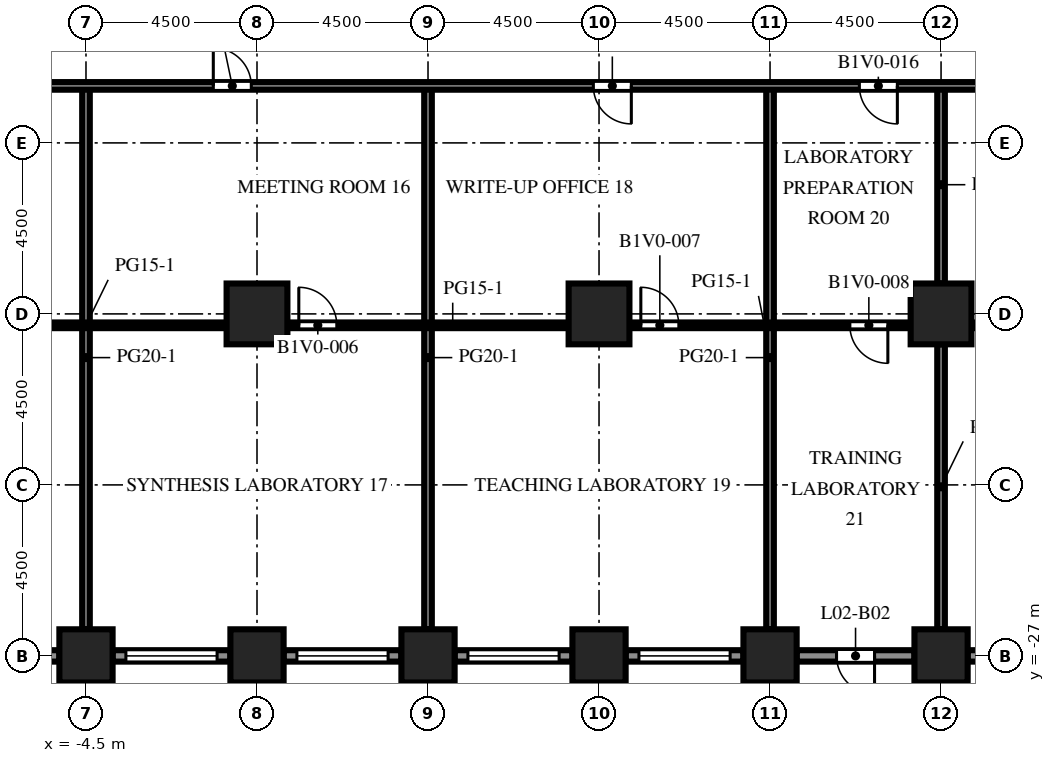
"""IFC4 building model, lengths in metres.
Left out: names, types, materials, properties, quantities, classifications, styles, units other than length and angle.
Written with IfcOpenShell. Run it as: python <this file> out.ifc"""

import sys

from ifc_helpers import new_model, si_unit, direction, frame, frame_2d, origin, origin_2d, place, context, subcontext, project, spatial, rectangle, extrude, element, fill, save


model = new_model("IFC4")
c1 = context("Model", 3, precision=1e-05, world=origin(), true_north=direction((0.0, 1.0)))
c2 = subcontext(c1, "Body", "Model", "MODEL_VIEW")
j1 = project(units=[si_unit("LENGTHUNIT", "METRE"), si_unit("PLANEANGLEUNIT", "RADIAN")], contexts=[c1])
p1 = place(None, origin())
s1 = spatial("IfcSite", under=j1, at=p1, CompositionType="ELEMENT")
p2 = place(p1, origin())
s2 = spatial("IfcBuilding", under=s1, at=p2, CompositionType="ELEMENT")
p3 = place(p2, frame((0.0, 0.0, 11.3)))
s3 = spatial("IfcBuildingStorey", under=s2, at=p3, CompositionType="ELEMENT", Elevation=11.3)
for number, where, z_axis, x_axis in (
    (1, (-4.5, -27.0, 0.0), (0.0, 0.0, 1.0), (1.0, 0.0, 0.0)),
    (2, (0.0, -27.0, 0.0), (0.0, 0.0, 1.0), (1.0, 0.0, 0.0)),
    (3, (4.5, -27.0, 0.0), (0.0, 0.0, 1.0), (1.0, 0.0, 0.0)),
    (4, (9.0, -27.0, 0.0), (0.0, 0.0, 1.0), (1.0, 0.0, 0.0)),
    (5, (13.5, -27.0, 0.0), (0.0, 0.0, 1.0), (1.0, 0.0, 0.0)),
    (6, (18.0, -27.0, 0.0), (0.0, 0.0, 1.0), (1.0, 0.0, 0.0)),
):
    element("IfcColumn", number, at=place(p3, frame(where, z_axis=z_axis, x_axis=x_axis)), inside=s3, PredefinedType="COLUMN", context=c2, shape_type="SweptSolid", body=[
        extrude(rectangle(XDim=1.4, YDim=1.4, at=origin_2d()), origin(), (0.0, 0.0, 1.0), 4.1),
    ])
for number, where, z_axis, x_axis in (
    (7, (0.0, -18.0, 0.0), (0.0, 0.0, 1.0), (1.0, 0.0, 0.0)),
    (8, (9.0, -18.0, 0.0), (0.0, 0.0, 1.0), (1.0, 0.0, 0.0)),
    (9, (18.0, -18.0, 0.0), (0.0, 0.0, 1.0), (1.0, 0.0, 0.0)),
):
    element("IfcColumn", number, at=place(p3, frame(where, z_axis=z_axis, x_axis=x_axis)), inside=s3, PredefinedType="COLUMN", context=c2, shape_type="SweptSolid", body=[
        extrude(rectangle(XDim=1.6, YDim=1.6, at=origin_2d()), origin(), (0.0, 0.0, 1.0), 4.1),
    ])
p4 = place(p3, frame((-5.2, -27.0, 0.0), z_axis=(0.0, 0.0, 1.0), x_axis=(-1.0, 0.0, 0.0)))
e10 = element("IfcWall", 10, at=p4, inside=s3, PredefinedType="SOLIDWALL", context=c2, shape_type="SweptSolid", body=[
    extrude(rectangle(XDim=3.1, YDim=0.3, at=frame_2d((1.55, 0.0))), origin(), (0.0, 0.0, 1.0), 2.75),
])
p5 = place(p4, frame((0.35, 0.0, 0.8)))
e11 = element("IfcOpeningElement", 11, at=p5, cuts=e10, PredefinedType="OPENING", context=c2, shape_type="SweptSolid", body=[
    extrude(rectangle(XDim=2.4, YDim=1.7, at=frame_2d((1.2, 0.85))), frame((0.0, 0.16, 0.0), z_axis=(0.0, -1.0, 0.0), x_axis=(1.0, 0.0, 0.0)), (0.0, 0.0, 1.0), 0.32),
])
p6 = place(p3, frame((-0.7, -27.0, 0.0), z_axis=(0.0, 0.0, 1.0), x_axis=(-1.0, 0.0, 0.0)))
e12 = element("IfcWall", 12, at=p6, inside=s3, PredefinedType="SOLIDWALL", context=c2, shape_type="SweptSolid", body=[
    extrude(rectangle(XDim=3.1, YDim=0.3, at=frame_2d((1.55, 0.0))), origin(), (0.0, 0.0, 1.0), 2.75),
])
p7 = place(p6, frame((0.35, 0.0, 0.8)))
e13 = element("IfcOpeningElement", 13, at=p7, cuts=e12, PredefinedType="OPENING", context=c2, shape_type="SweptSolid", body=[
    extrude(rectangle(XDim=2.4, YDim=1.7, at=frame_2d((1.2, 0.85))), frame((0.0, 0.16, 0.0), z_axis=(0.0, -1.0, 0.0), x_axis=(1.0, 0.0, 0.0)), (0.0, 0.0, 1.0), 0.32),
])
p8 = place(p3, frame((3.8, -27.0, 0.0), z_axis=(0.0, 0.0, 1.0), x_axis=(-1.0, 0.0, 0.0)))
e14 = element("IfcWall", 14, at=p8, inside=s3, PredefinedType="SOLIDWALL", context=c2, shape_type="SweptSolid", body=[
    extrude(rectangle(XDim=3.1, YDim=0.3, at=frame_2d((1.55, 0.0))), origin(), (0.0, 0.0, 1.0), 2.75),
])
p9 = place(p8, frame((0.35, 0.0, 0.8)))
e15 = element("IfcOpeningElement", 15, at=p9, cuts=e14, PredefinedType="OPENING", context=c2, shape_type="SweptSolid", body=[
    extrude(rectangle(XDim=2.4, YDim=1.7, at=frame_2d((1.2, 0.85))), frame((0.0, 0.16, 0.0), z_axis=(0.0, -1.0, 0.0), x_axis=(1.0, 0.0, 0.0)), (0.0, 0.0, 1.0), 0.32),
])
p10 = place(p3, frame((8.3, -27.0, 0.0), z_axis=(0.0, 0.0, 1.0), x_axis=(-1.0, 0.0, 0.0)))
e16 = element("IfcWall", 16, at=p10, inside=s3, PredefinedType="SOLIDWALL", context=c2, shape_type="SweptSolid", body=[
    extrude(rectangle(XDim=3.1, YDim=0.3, at=frame_2d((1.55, 0.0))), origin(), (0.0, 0.0, 1.0), 2.75),
])
p11 = place(p10, frame((0.35, 0.0, 0.8)))
e17 = element("IfcOpeningElement", 17, at=p11, cuts=e16, PredefinedType="OPENING", context=c2, shape_type="SweptSolid", body=[
    extrude(rectangle(XDim=2.4, YDim=1.7, at=frame_2d((1.2, 0.85))), frame((0.0, 0.16, 0.0), z_axis=(0.0, -1.0, 0.0), x_axis=(1.0, 0.0, 0.0)), (0.0, 0.0, 1.0), 0.32),
])
p12 = place(p3, frame((12.8, -27.0, 0.0), z_axis=(0.0, 0.0, 1.0), x_axis=(-1.0, 0.0, 0.0)))
e18 = element("IfcWall", 18, at=p12, inside=s3, PredefinedType="SOLIDWALL", context=c2, shape_type="SweptSolid", body=[
    extrude(rectangle(XDim=3.1, YDim=0.3, at=frame_2d((1.55, 0.0))), origin(), (0.0, 0.0, 1.0), 2.75),
])
p13 = place(p12, frame((0.35, 0.0, 0.8)))
e19 = element("IfcOpeningElement", 19, at=p13, cuts=e18, PredefinedType="OPENING", context=c2, shape_type="SweptSolid", body=[
    extrude(rectangle(XDim=2.4, YDim=1.7, at=frame_2d((1.2, 0.85))), frame((0.0, 0.16, 0.0), z_axis=(0.0, -1.0, 0.0), x_axis=(1.0, 0.0, 0.0)), (0.0, 0.0, 1.0), 0.32),
])
p14 = place(p3, frame((17.3, -27.0, 0.0), z_axis=(0.0, 0.0, 1.0), x_axis=(-1.0, 0.0, 0.0)))
e20 = element("IfcWall", 20, at=p14, inside=s3, PredefinedType="SOLIDWALL", context=c2, shape_type="SweptSolid", body=[
    extrude(rectangle(XDim=3.1, YDim=0.3, at=frame_2d((1.55, 0.0))), origin(), (0.0, 0.0, 1.0), 2.75),
])
p15 = place(p14, frame((1.05, 0.0, 0.0)))
e21 = element("IfcOpeningElement", 21, at=p15, cuts=e20, PredefinedType="OPENING", context=c2, shape_type="SweptSolid", body=[
    extrude(rectangle(XDim=1.0, YDim=2.2, at=frame_2d((0.5, 1.1))), frame((0.0, 0.16, 0.0), z_axis=(0.0, -1.0, 0.0), x_axis=(1.0, 0.0, 0.0)), (0.0, 0.0, 1.0), 0.32),
])
p16 = place(p3, frame((21.8, -27.0, 0.0), z_axis=(0.0, 0.0, 1.0), x_axis=(-1.0, 0.0, 0.0)))
e22 = element("IfcWall", 22, at=p16, inside=s3, PredefinedType="SOLIDWALL", context=c2, shape_type="SweptSolid", body=[
    extrude(rectangle(XDim=3.1, YDim=0.3, at=frame_2d((1.55, 0.0))), origin(), (0.0, 0.0, 1.0), 2.75),
])
p17 = place(p16, frame((0.35, 0.0, 0.8)))
e23 = element("IfcOpeningElement", 23, at=p17, cuts=e22, PredefinedType="OPENING", context=c2, shape_type="SweptSolid", body=[
    extrude(rectangle(XDim=2.4, YDim=1.7, at=frame_2d((1.2, 0.85))), frame((0.0, 0.16, 0.0), z_axis=(0.0, -1.0, 0.0), x_axis=(1.0, 0.0, 0.0)), (0.0, 0.0, 1.0), 0.32),
])
for number, where, z_axis, x_axis in (
    (24, (-4.5, -26.3, 0.0), (0.0, 0.0, 1.0), (0.0, 1.0, 0.0)),
    (25, (4.5, -26.3, 0.0), (0.0, 0.0, 1.0), (0.0, 1.0, 0.0)),
    (26, (13.5, -26.3, 0.0), (0.0, 0.0, 1.0), (0.0, 1.0, 0.0)),
):
    element("IfcWall", number, at=place(p3, frame(where, z_axis=z_axis, x_axis=x_axis)), inside=s3, PredefinedType="PARTITIONING", context=c2, shape_type="SweptSolid", body=[
        extrude(rectangle(XDim=14.3, YDim=0.2, at=frame_2d((7.15, 0.0))), origin(), (0.0, 0.0, 1.0), 3.65),
    ])
p18 = place(p3, frame((18.0, -26.3, 0.0), z_axis=(0.0, 0.0, 1.0), x_axis=(0.0, 1.0, 0.0)))
e27 = element("IfcWall", 27, at=p18, inside=s3, PredefinedType="PARTITIONING", context=c2, shape_type="SweptSolid", body=[
    extrude(rectangle(XDim=7.5, YDim=0.2, at=frame_2d((3.75, 0.0))), origin(), (0.0, 0.0, 1.0), 3.65),
])
p19 = place(p3, frame((18.0, -17.2, 0.0), z_axis=(0.0, 0.0, 1.0), x_axis=(0.0, 1.0, 0.0)))
e28 = element("IfcWall", 28, at=p19, inside=s3, PredefinedType="PARTITIONING", context=c2, shape_type="SweptSolid", body=[
    extrude(rectangle(XDim=5.2, YDim=0.2, at=frame_2d((2.6, 0.0))), origin(), (0.0, 0.0, 1.0), 3.65),
])
p20 = place(p3, frame((-8.2, -18.3, 0.0), z_axis=(0.0, 0.0, 1.0), x_axis=(1.0, 0.0, 0.0)))
e29 = element("IfcWall", 29, at=p20, inside=s3, PredefinedType="PARTITIONING", context=c2, shape_type="SweptSolid", body=[
    extrude(rectangle(XDim=7.4, YDim=0.15, at=frame_2d((3.7, 0.0))), origin(), (0.0, 0.0, 1.0), 3.65),
])
p21 = place(p3, frame((8.2, -18.3, 0.0), z_axis=(0.0, 0.0, 1.0), x_axis=(-1.0, 0.0, 0.0)))
e30 = element("IfcWall", 30, at=p21, inside=s3, PredefinedType="PARTITIONING", context=c2, shape_type="SweptSolid", body=[
    extrude(rectangle(XDim=7.4, YDim=0.15, at=frame_2d((3.7, 0.0))), origin(), (0.0, 0.0, 1.0), 3.65),
])
p22 = place(p21, frame((6.1, 0.0, 0.0)))
e31 = element("IfcOpeningElement", 31, at=p22, cuts=e30, PredefinedType="OPENING", context=c2, shape_type="SweptSolid", body=[
    extrude(rectangle(XDim=1.0, YDim=2.1, at=frame_2d((0.5, 1.05))), frame((0.0, 0.085, 0.0), z_axis=(0.0, -1.0, 0.0), x_axis=(1.0, 0.0, 0.0)), (0.0, 0.0, 1.0), 0.17),
])
p23 = place(p3, frame((17.2, -18.3, 0.0), z_axis=(0.0, 0.0, 1.0), x_axis=(-1.0, 0.0, 0.0)))
e32 = element("IfcWall", 32, at=p23, inside=s3, PredefinedType="PARTITIONING", context=c2, shape_type="SweptSolid", body=[
    extrude(rectangle(XDim=7.4, YDim=0.15, at=frame_2d((3.7, 0.0))), origin(), (0.0, 0.0, 1.0), 3.65),
])
p24 = place(p23, frame((6.1, 0.0, 0.0)))
e33 = element("IfcOpeningElement", 33, at=p24, cuts=e32, PredefinedType="OPENING", context=c2, shape_type="SweptSolid", body=[
    extrude(rectangle(XDim=1.0, YDim=2.1, at=frame_2d((0.5, 1.05))), frame((0.0, 0.085, 0.0), z_axis=(0.0, -1.0, 0.0), x_axis=(1.0, 0.0, 0.0)), (0.0, 0.0, 1.0), 0.17),
])
p25 = place(p23, frame((0.6, 0.0, 0.0)))
e34 = element("IfcOpeningElement", 34, at=p25, cuts=e32, PredefinedType="OPENING", context=c2, shape_type="SweptSolid", body=[
    extrude(rectangle(XDim=1.0, YDim=2.1, at=frame_2d((0.5, 1.05))), frame((0.0, 0.085, 0.0), z_axis=(0.0, -1.0, 0.0), x_axis=(1.0, 0.0, 0.0)), (0.0, 0.0, 1.0), 0.17),
])
p26 = place(p3, frame((18.8, -18.3, 0.0), z_axis=(0.0, 0.0, 1.0), x_axis=(1.0, 0.0, 0.0)))
e35 = element("IfcWall", 35, at=p26, inside=s3, PredefinedType="PARTITIONING", context=c2, shape_type="SweptSolid", body=[
    extrude(rectangle(XDim=2.9, YDim=0.15, at=frame_2d((1.45, 0.0))), origin(), (0.0, 0.0, 1.0), 3.65),
])
p27 = place(p3, frame((26.85, -12.0, 0.0), z_axis=(0.0, 0.0, 1.0), x_axis=(-1.0, 0.0, 0.0)))
e36 = element("IfcWall", 36, at=p27, inside=s3, PredefinedType="PARTITIONING", context=c2, shape_type="SweptSolid", body=[
    extrude(rectangle(XDim=53.7, YDim=0.2, at=frame_2d((26.85, 0.0))), origin(), (0.0, 0.0, 1.0), 3.65),
])
p28 = place(p27, frame((47.75, 0.0, 0.0)))
e37 = element("IfcOpeningElement", 37, at=p28, cuts=e36, PredefinedType="OPENING", context=c2, shape_type="SweptSolid", body=[
    extrude(rectangle(XDim=1.0, YDim=2.1, at=frame_2d((0.5, 1.05))), frame((0.0, 0.11, 0.0), z_axis=(0.0, -1.0, 0.0), x_axis=(1.0, 0.0, 0.0)), (0.0, 0.0, 1.0), 0.22),
])
p29 = place(p27, frame((39.5, 0.0, 0.0)))
e38 = element("IfcOpeningElement", 38, at=p29, cuts=e36, PredefinedType="OPENING", context=c2, shape_type="SweptSolid", body=[
    extrude(rectangle(XDim=1.0, YDim=2.1, at=frame_2d((0.5, 1.05))), frame((0.0, 0.11, 0.0), z_axis=(0.0, -1.0, 0.0), x_axis=(1.0, 0.0, 0.0)), (0.0, 0.0, 1.0), 0.22),
])
p30 = place(p27, frame((27.0, 0.0, 0.0)))
e39 = element("IfcOpeningElement", 39, at=p30, cuts=e36, PredefinedType="OPENING", context=c2, shape_type="SweptSolid", body=[
    extrude(rectangle(XDim=1.0, YDim=2.1, at=frame_2d((0.5, 1.05))), frame((0.0, 0.11, 0.0), z_axis=(0.0, -1.0, 0.0), x_axis=(1.0, 0.0, 0.0)), (0.0, 0.0, 1.0), 0.22),
])
p31 = place(p27, frame((17.0, 0.0, 0.0)))
e40 = element("IfcOpeningElement", 40, at=p31, cuts=e36, PredefinedType="OPENING", context=c2, shape_type="SweptSolid", body=[
    extrude(rectangle(XDim=1.0, YDim=2.1, at=frame_2d((0.5, 1.05))), frame((0.0, 0.11, 0.0), z_axis=(0.0, -1.0, 0.0), x_axis=(1.0, 0.0, 0.0)), (0.0, 0.0, 1.0), 0.22),
])
p32 = place(p27, frame((10.0, 0.0, 0.0)))
e41 = element("IfcOpeningElement", 41, at=p32, cuts=e36, PredefinedType="OPENING", context=c2, shape_type="SweptSolid", body=[
    extrude(rectangle(XDim=1.0, YDim=2.1, at=frame_2d((0.5, 1.05))), frame((0.0, 0.11, 0.0), z_axis=(0.0, -1.0, 0.0), x_axis=(1.0, 0.0, 0.0)), (0.0, 0.0, 1.0), 0.22),
])
p33 = place(p27, frame((4.0, 0.0, 0.0)))
e42 = element("IfcOpeningElement", 42, at=p33, cuts=e36, PredefinedType="OPENING", context=c2, shape_type="SweptSolid", body=[
    extrude(rectangle(XDim=1.0, YDim=2.1, at=frame_2d((0.5, 1.05))), frame((0.0, 0.11, 0.0), z_axis=(0.0, -1.0, 0.0), x_axis=(1.0, 0.0, 0.0)), (0.0, 0.0, 1.0), 0.22),
])
p34 = place(p7, origin())
e43 = element("IfcWindow", 43, at=p34, inside=s3, PartitioningType="SINGLE_PANEL", PredefinedType="WINDOW", context=c2, shape_type="SweptSolid", body=[
    extrude(rectangle(XDim=2.4, YDim=1.7, at=frame_2d((1.2, 0.85))), frame((0.0, 0.03, 0.0), z_axis=(0.0, -1.0, 0.0), x_axis=(1.0, 0.0, 0.0)), (0.0, 0.0, 1.0), 0.06),
])
fill(e13, e43)
p35 = place(p9, origin())
e44 = element("IfcWindow", 44, at=p35, inside=s3, PartitioningType="SINGLE_PANEL", PredefinedType="WINDOW", context=c2, shape_type="SweptSolid", body=[
    extrude(rectangle(XDim=2.4, YDim=1.7, at=frame_2d((1.2, 0.85))), frame((0.0, 0.03, 0.0), z_axis=(0.0, -1.0, 0.0), x_axis=(1.0, 0.0, 0.0)), (0.0, 0.0, 1.0), 0.06),
])
fill(e15, e44)
p36 = place(p11, origin())
e45 = element("IfcWindow", 45, at=p36, inside=s3, PartitioningType="SINGLE_PANEL", PredefinedType="WINDOW", context=c2, shape_type="SweptSolid", body=[
    extrude(rectangle(XDim=2.4, YDim=1.7, at=frame_2d((1.2, 0.85))), frame((0.0, 0.03, 0.0), z_axis=(0.0, -1.0, 0.0), x_axis=(1.0, 0.0, 0.0)), (0.0, 0.0, 1.0), 0.06),
])
fill(e17, e45)
p37 = place(p13, origin())
e46 = element("IfcWindow", 46, at=p37, inside=s3, PartitioningType="SINGLE_PANEL", PredefinedType="WINDOW", context=c2, shape_type="SweptSolid", body=[
    extrude(rectangle(XDim=2.4, YDim=1.7, at=frame_2d((1.2, 0.85))), frame((0.0, 0.03, 0.0), z_axis=(0.0, -1.0, 0.0), x_axis=(1.0, 0.0, 0.0)), (0.0, 0.0, 1.0), 0.06),
])
fill(e19, e46)
p38 = place(p15, origin())
e47 = element("IfcDoor", 47, at=p38, inside=s3, OperationType="SINGLE_SWING_LEFT", PredefinedType="DOOR", context=c2, shape_type="SweptSolid", body=[
    extrude(rectangle(XDim=1.0, YDim=2.2, at=frame_2d((0.5, 1.1))), frame((0.0, 0.025, 0.0), z_axis=(0.0, -1.0, 0.0), x_axis=(1.0, 0.0, 0.0)), (0.0, 0.0, 1.0), 0.05),
])
fill(e21, e47)
p39 = place(p22, origin())
e48 = element("IfcDoor", 48, at=p39, inside=s3, OperationType="SINGLE_SWING_RIGHT", PredefinedType="DOOR", context=c2, shape_type="SweptSolid", body=[
    extrude(rectangle(XDim=1.0, YDim=2.1, at=frame_2d((0.5, 1.05))), frame((0.0, 0.025, 0.0), z_axis=(0.0, -1.0, 0.0), x_axis=(1.0, 0.0, 0.0)), (0.0, 0.0, 1.0), 0.05),
])
fill(e31, e48)
p40 = place(p24, origin())
e49 = element("IfcDoor", 49, at=p40, inside=s3, OperationType="SINGLE_SWING_RIGHT", PredefinedType="DOOR", context=c2, shape_type="SweptSolid", body=[
    extrude(rectangle(XDim=1.0, YDim=2.1, at=frame_2d((0.5, 1.05))), frame((0.0, 0.025, 0.0), z_axis=(0.0, -1.0, 0.0), x_axis=(1.0, 0.0, 0.0)), (0.0, 0.0, 1.0), 0.05),
])
fill(e33, e49)
p41 = place(p25, origin())
e50 = element("IfcDoor", 50, at=p41, inside=s3, OperationType="SINGLE_SWING_LEFT", PredefinedType="DOOR", context=c2, shape_type="SweptSolid", body=[
    extrude(rectangle(XDim=1.0, YDim=2.1, at=frame_2d((0.5, 1.05))), frame((0.0, 0.025, 0.0), z_axis=(0.0, -1.0, 0.0), x_axis=(1.0, 0.0, 0.0)), (0.0, 0.0, 1.0), 0.05),
])
fill(e34, e50)
p42 = place(p30, origin())
e51 = element("IfcDoor", 51, at=p42, inside=s3, OperationType="SINGLE_SWING_RIGHT", PredefinedType="DOOR", context=c2, shape_type="SweptSolid", body=[
    extrude(rectangle(XDim=1.0, YDim=2.1, at=frame_2d((0.5, 1.05))), frame((0.0, 0.025, 0.0), z_axis=(0.0, -1.0, 0.0), x_axis=(1.0, 0.0, 0.0)), (0.0, 0.0, 1.0), 0.05),
])
fill(e39, e51)
p43 = place(p31, origin())
e52 = element("IfcDoor", 52, at=p43, inside=s3, OperationType="SINGLE_SWING_LEFT", PredefinedType="DOOR", context=c2, shape_type="SweptSolid", body=[
    extrude(rectangle(XDim=1.0, YDim=2.1, at=frame_2d((0.5, 1.05))), frame((0.0, 0.025, 0.0), z_axis=(0.0, -1.0, 0.0), x_axis=(1.0, 0.0, 0.0)), (0.0, 0.0, 1.0), 0.05),
])
fill(e40, e52)
p44 = place(p32, origin())
e53 = element("IfcDoor", 53, at=p44, inside=s3, OperationType="SINGLE_SWING_LEFT", PredefinedType="DOOR", context=c2, shape_type="SweptSolid", body=[
    extrude(rectangle(XDim=1.0, YDim=2.1, at=frame_2d((0.5, 1.05))), frame((0.0, 0.025, 0.0), z_axis=(0.0, -1.0, 0.0), x_axis=(1.0, 0.0, 0.0)), (0.0, 0.0, 1.0), 0.05),
])
fill(e41, e53)
save(model, sys.argv[1])
